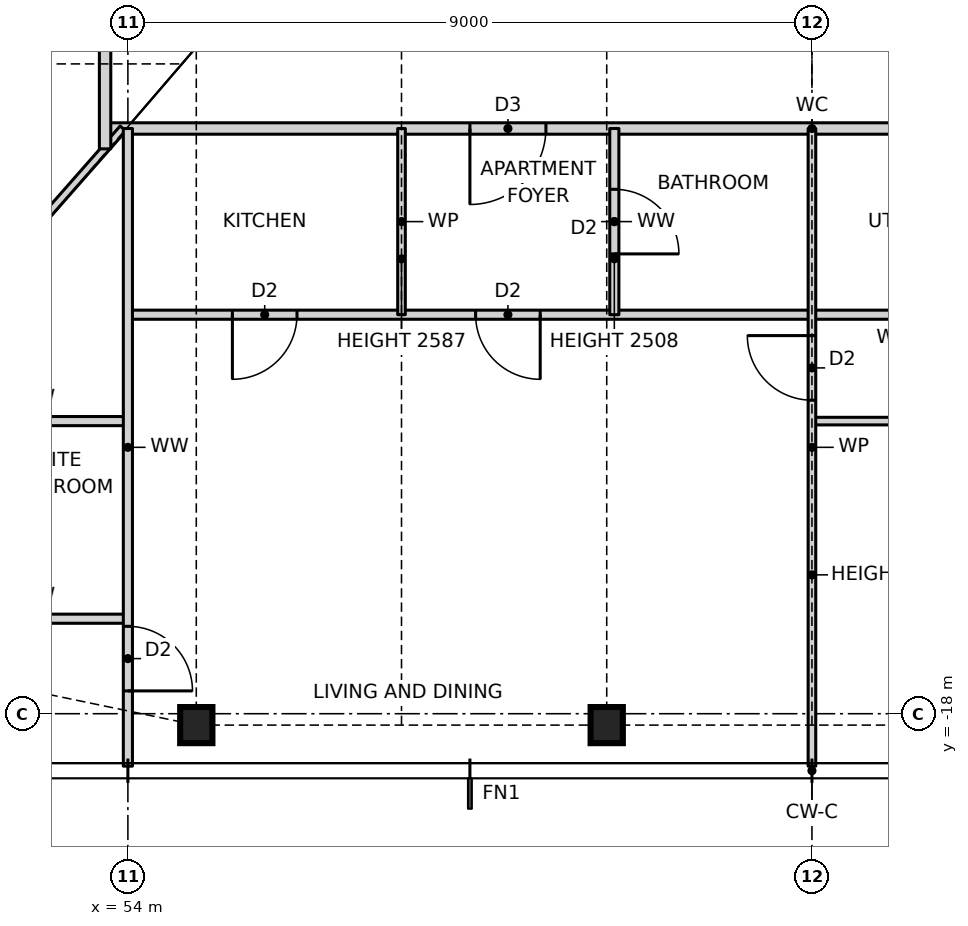
"""IFC4 building model, lengths in metres.
Left out: names, types, materials, properties, quantities, classifications, styles, units other than length and angle.
Written with IfcOpenShell. Run it as: python <this file> out.ifc"""

import sys

from ifc_helpers import new_model, si_unit, direction, frame, frame_2d, origin, origin_2d, place, context, subcontext, project, spatial, rectangle, i_section, extrude, element, fill, save


model = new_model("IFC4")
c1 = context("Model", 3, precision=1e-05, world=origin(), true_north=direction((0.0, 1.0)))
c2 = subcontext(c1, "Body", "Model", "MODEL_VIEW")
j1 = project(units=[si_unit("LENGTHUNIT", "METRE"), si_unit("PLANEANGLEUNIT", "RADIAN")], contexts=[c1])
p1 = place(None, origin())
s1 = spatial("IfcSite", under=j1, at=p1, CompositionType="ELEMENT")
p2 = place(p1, origin())
s2 = spatial("IfcBuilding", under=s1, at=p2, CompositionType="ELEMENT")
p3 = place(p2, frame((0.0, 0.0, 39.5)))
s3 = spatial("IfcBuildingStorey", under=s2, at=p3, CompositionType="ELEMENT", Elevation=39.5)
for number, where, z_axis, x_axis in (
    (1, (54.9, -18.15, 0.0), (0.0, 0.0, 1.0), (1.0, 0.0, 0.0)),
    (2, (60.3, -18.15, 0.0), (0.0, 0.0, 1.0), (1.0, 0.0, 0.0)),
):
    element("IfcColumn", number, at=place(p3, frame(where, z_axis=z_axis, x_axis=x_axis)), inside=s3, PredefinedType="COLUMN", context=c2, shape_type="SweptSolid", body=[
        extrude(i_section(OverallWidth=0.424, OverallDepth=0.475, WebThickness=0.048, FlangeThickness=0.077, at=origin_2d()), origin(), (0.0, 0.0, 1.0), 3.5),
    ])
for number, where, z_axis, x_axis in (
    (3, (51.6, -16.75, 0.0), (0.0, 0.0, 1.0), (1.0, 0.0, 0.0)),
    (4, (51.6, -14.15, 0.0), (0.0, 0.0, 1.0), (1.0, 0.0, 0.0)),
):
    element("IfcWall", number, at=place(p3, frame(where, z_axis=z_axis, x_axis=x_axis)), inside=s3, PredefinedType="PARTITIONING", context=c2, shape_type="SweptSolid", body=[
        extrude(rectangle(XDim=2.4, YDim=0.12, at=frame_2d((1.2, 0.0))), origin(), (0.0, 0.0, 1.0), 3.27),
    ])
p4 = place(p3, frame((63.0, -14.15, 0.0), z_axis=(0.0, 0.0, 1.0), x_axis=(1.0, 0.0, 0.0)))
e5 = element("IfcWall", 5, at=p4, inside=s3, PredefinedType="PARTITIONING", context=c2, shape_type="SweptSolid", body=[
    extrude(rectangle(XDim=11.2, YDim=0.1, at=frame_2d((5.6, 0.0))), origin(), (0.0, 0.0, 1.0), 3.27),
])
p5 = place(p4, frame((1.825, 0.0, 0.0)))
e6 = element("IfcOpeningElement", 6, at=p5, cuts=e5, PredefinedType="OPENING", context=c2, shape_type="SweptSolid", body=[
    extrude(rectangle(XDim=0.85, YDim=2.1, at=frame_2d((0.425, 1.05))), frame((0.0, 0.06, 0.0), z_axis=(0.0, -1.0, 0.0), x_axis=(1.0, 0.0, 0.0)), (0.0, 0.0, 1.0), 0.12),
])
p6 = place(p4, frame((6.325, 0.0, 0.0)))
e7 = element("IfcOpeningElement", 7, at=p6, cuts=e5, PredefinedType="OPENING", context=c2, shape_type="SweptSolid", body=[
    extrude(rectangle(XDim=0.85, YDim=2.1, at=frame_2d((0.425, 1.05))), frame((0.0, 0.06, 0.0), z_axis=(0.0, -1.0, 0.0), x_axis=(1.0, 0.0, 0.0)), (0.0, 0.0, 1.0), 0.12),
])
p7 = place(p4, frame((9.675, 0.0, 0.0)))
e8 = element("IfcOpeningElement", 8, at=p7, cuts=e5, PredefinedType="OPENING", context=c2, shape_type="SweptSolid", body=[
    extrude(rectangle(XDim=0.85, YDim=2.1, at=frame_2d((0.425, 1.05))), frame((0.0, 0.06, 0.0), z_axis=(0.0, -1.0, 0.0), x_axis=(1.0, 0.0, 0.0)), (0.0, 0.0, 1.0), 0.12),
])
p8 = place(p3, frame((54.0, -12.75, 0.0), z_axis=(0.0, 0.0, 1.0), x_axis=(1.0, 0.0, 0.0)))
e9 = element("IfcWall", 9, at=p8, inside=s3, PredefinedType="PARTITIONING", context=c2, shape_type="SweptSolid", body=[
    extrude(rectangle(XDim=20.2, YDim=0.12, at=frame_2d((10.1, 0.0))), origin(), (0.0, 0.0, 1.0), 3.27),
])
p9 = place(p8, frame((1.375, 0.0, 0.0)))
e10 = element("IfcOpeningElement", 10, at=p9, cuts=e9, PredefinedType="OPENING", context=c2, shape_type="SweptSolid", body=[
    extrude(rectangle(XDim=0.85, YDim=2.1, at=frame_2d((0.425, 1.05))), frame((0.0, 0.07, 0.0), z_axis=(0.0, -1.0, 0.0), x_axis=(1.0, 0.0, 0.0)), (0.0, 0.0, 1.0), 0.14),
])
p10 = place(p8, frame((4.575, 0.0, 0.0)))
e11 = element("IfcOpeningElement", 11, at=p10, cuts=e9, PredefinedType="OPENING", context=c2, shape_type="SweptSolid", body=[
    extrude(rectangle(XDim=0.85, YDim=2.1, at=frame_2d((0.425, 1.05))), frame((0.0, 0.07, 0.0), z_axis=(0.0, -1.0, 0.0), x_axis=(1.0, 0.0, 0.0)), (0.0, 0.0, 1.0), 0.14),
])
p11 = place(p8, frame((10.225, 0.0, 0.0)))
e12 = element("IfcOpeningElement", 12, at=p11, cuts=e9, PredefinedType="OPENING", context=c2, shape_type="SweptSolid", body=[
    extrude(rectangle(XDim=0.85, YDim=2.1, at=frame_2d((0.425, 1.05))), frame((0.0, 0.07, 0.0), z_axis=(0.0, -1.0, 0.0), x_axis=(1.0, 0.0, 0.0)), (0.0, 0.0, 1.0), 0.14),
])
p12 = place(p8, frame((15.825, 0.0, 0.0)))
e13 = element("IfcOpeningElement", 13, at=p12, cuts=e9, PredefinedType="OPENING", context=c2, shape_type="SweptSolid", body=[
    extrude(rectangle(XDim=0.85, YDim=2.1, at=frame_2d((0.425, 1.05))), frame((0.0, 0.07, 0.0), z_axis=(0.0, -1.0, 0.0), x_axis=(1.0, 0.0, 0.0)), (0.0, 0.0, 1.0), 0.14),
])
p13 = place(p3, frame((53.7, -10.3, 0.0), z_axis=(0.0, 0.0, 1.0), x_axis=(1.0, 0.0, 0.0)))
e14 = element("IfcWall", 14, at=p13, inside=s3, PredefinedType="PARTITIONING", context=c2, shape_type="SweptSolid", body=[
    extrude(rectangle(XDim=18.6, YDim=0.15, at=frame_2d((9.3, 0.0))), origin(), (0.0, 0.0, 1.0), 3.27),
])
p14 = place(p13, frame((4.8, 0.0, 0.0)))
e15 = element("IfcOpeningElement", 15, at=p14, cuts=e14, PredefinedType="OPENING", context=c2, shape_type="SweptSolid", body=[
    extrude(rectangle(XDim=1.0, YDim=2.1, at=frame_2d((0.5, 1.05))), frame((0.0, 0.085, 0.0), z_axis=(0.0, -1.0, 0.0), x_axis=(1.0, 0.0, 0.0)), (0.0, 0.0, 1.0), 0.17),
])
p15 = place(p3, frame((47.944, -17.109, 0.0), z_axis=(0.0, 0.0, 1.0), x_axis=(0.660638210404, 0.750704439146, 0.0)))
e16 = element("IfcWall", 16, at=p15, inside=s3, PredefinedType="PARTITIONING", context=c2, shape_type="SweptSolid", body=[
    extrude(rectangle(XDim=9.07, YDim=0.1, at=frame_2d((4.535, 0.0))), origin(), (0.0, 0.0, 1.0), 2.429),
])
p16 = place(p3, frame((63.0, -18.69, 0.0), z_axis=(0.0, 0.0, 1.0), x_axis=(0.0, 1.0, 0.0)))
e17 = element("IfcWall", 17, at=p16, inside=s3, PredefinedType="PARTITIONING", context=c2, shape_type="SweptSolid", body=[
    extrude(rectangle(XDim=8.39, YDim=0.1, at=frame_2d((4.195, 0.0))), origin(), (0.0, 0.0, 1.0), 2.587),
])
p17 = place(p16, frame((4.815, 0.0, 0.0)))
e18 = element("IfcOpeningElement", 18, at=p17, cuts=e17, PredefinedType="OPENING", context=c2, shape_type="SweptSolid", body=[
    extrude(rectangle(XDim=0.85, YDim=2.1, at=frame_2d((0.425, 1.05))), frame((0.0, 0.06, 0.0), z_axis=(0.0, -1.0, 0.0), x_axis=(1.0, 0.0, 0.0)), (0.0, 0.0, 1.0), 0.12),
])
p18 = place(p3, frame((60.4, -12.75, 0.0), z_axis=(0.0, 0.0, 1.0), x_axis=(0.0, 1.0, 0.0)))
e19 = element("IfcWall", 19, at=p18, inside=s3, PredefinedType="PARTITIONING", context=c2, shape_type="SweptSolid", body=[
    extrude(rectangle(XDim=2.45, YDim=0.12, at=frame_2d((1.225, 0.0))), origin(), (0.0, 0.0, 1.0), 2.508),
])
p19 = place(p18, frame((0.8, 0.0, 0.0)))
e20 = element("IfcOpeningElement", 20, at=p19, cuts=e19, PredefinedType="OPENING", context=c2, shape_type="SweptSolid", body=[
    extrude(rectangle(XDim=0.85, YDim=2.1, at=frame_2d((0.425, 1.05))), frame((0.0, 0.07, 0.0), z_axis=(0.0, -1.0, 0.0), x_axis=(1.0, 0.0, 0.0)), (0.0, 0.0, 1.0), 0.14),
])
p20 = place(p3, frame((57.6, -12.75, 0.0), z_axis=(0.0, 0.0, 1.0), x_axis=(0.0, 1.0, 0.0)))
e21 = element("IfcWall", 21, at=p20, inside=s3, PredefinedType="PARTITIONING", context=c2, shape_type="SweptSolid", body=[
    extrude(rectangle(XDim=2.45, YDim=0.1, at=frame_2d((1.225, 0.0))), origin(), (0.0, 0.0, 1.0), 2.587),
])
p21 = place(p3, frame((54.0, -18.69, 0.0), z_axis=(0.0, 0.0, 1.0), x_axis=(0.0, 1.0, 0.0)))
e22 = element("IfcWall", 22, at=p21, inside=s3, PredefinedType="PARTITIONING", context=c2, shape_type="SweptSolid", body=[
    extrude(rectangle(XDim=8.39, YDim=0.12, at=frame_2d((4.195, 0.0))), origin(), (0.0, 0.0, 1.0), 3.27),
])
p22 = place(p21, frame((0.99, 0.0, 0.0)))
e23 = element("IfcOpeningElement", 23, at=p22, cuts=e22, PredefinedType="OPENING", context=c2, shape_type="SweptSolid", body=[
    extrude(rectangle(XDim=0.85, YDim=2.1, at=frame_2d((0.425, 1.05))), frame((0.0, 0.07, 0.0), z_axis=(0.0, -1.0, 0.0), x_axis=(1.0, 0.0, 0.0)), (0.0, 0.0, 1.0), 0.14),
])
p23 = place(p3, frame((53.7, -10.568, 0.0), z_axis=(0.0, 0.0, 1.0), x_axis=(0.0, 1.0, 0.0)))
e24 = element("IfcWall", 24, at=p23, inside=s3, PredefinedType="PARTITIONING", context=c2, shape_type="SweptSolid", body=[
    extrude(rectangle(XDim=21.468, YDim=0.15, at=frame_2d((10.734, 0.0))), origin(), (0.0, 0.0, 1.0), 3.27),
])
p24 = place(p23, frame((11.818, 0.0, 0.0)))
e25 = element("IfcOpeningElement", 25, at=p24, cuts=e24, PredefinedType="OPENING", context=c2, shape_type="SweptSolid", body=[
    extrude(rectangle(XDim=1.0, YDim=2.1, at=frame_2d((0.5, 1.05))), frame((0.0, 0.085, 0.0), z_axis=(0.0, -1.0, 0.0), x_axis=(1.0, 0.0, 0.0)), (0.0, 0.0, 1.0), 0.17),
])
p25 = place(p9, frame((0.85, 0.0, 0.0), z_axis=(0.0, 0.0, 1.0), x_axis=(-1.0, 0.0, 0.0)))
e26 = element("IfcDoor", 26, at=p25, inside=s3, OperationType="SINGLE_SWING_RIGHT", PredefinedType="DOOR", context=c2, shape_type="SweptSolid", body=[
    extrude(rectangle(XDim=0.85, YDim=2.1, at=frame_2d((0.425, 1.05))), frame((0.0, 0.025, 0.0), z_axis=(0.0, -1.0, 0.0), x_axis=(1.0, 0.0, 0.0)), (0.0, 0.0, 1.0), 0.05),
])
fill(e10, e26)
p26 = place(p14, frame((1.0, 0.0, 0.0), z_axis=(0.0, 0.0, 1.0), x_axis=(-1.0, 0.0, 0.0)))
e27 = element("IfcDoor", 27, at=p26, inside=s3, OperationType="SINGLE_SWING_RIGHT", PredefinedType="DOOR", context=c2, shape_type="SweptSolid", body=[
    extrude(rectangle(XDim=1.0, YDim=2.1, at=frame_2d((0.5, 1.05))), frame((0.0, 0.025, 0.0), z_axis=(0.0, -1.0, 0.0), x_axis=(1.0, 0.0, 0.0)), (0.0, 0.0, 1.0), 0.05),
])
fill(e15, e27)
p27 = place(p10, frame((0.85, 0.0, 0.0), z_axis=(0.0, 0.0, 1.0), x_axis=(-1.0, 0.0, 0.0)))
e28 = element("IfcDoor", 28, at=p27, inside=s3, OperationType="SINGLE_SWING_LEFT", PredefinedType="DOOR", context=c2, shape_type="SweptSolid", body=[
    extrude(rectangle(XDim=0.85, YDim=2.1, at=frame_2d((0.425, 1.05))), frame((0.0, 0.025, 0.0), z_axis=(0.0, -1.0, 0.0), x_axis=(1.0, 0.0, 0.0)), (0.0, 0.0, 1.0), 0.05),
])
fill(e11, e28)
p28 = place(p19, frame((0.85, 0.0, 0.0), z_axis=(0.0, 0.0, 1.0), x_axis=(-1.0, 0.0, 0.0)))
e29 = element("IfcDoor", 29, at=p28, inside=s3, OperationType="SINGLE_SWING_RIGHT", PredefinedType="DOOR", context=c2, shape_type="SweptSolid", body=[
    extrude(rectangle(XDim=0.85, YDim=2.1, at=frame_2d((0.425, 1.05))), frame((0.0, 0.025, 0.0), z_axis=(0.0, -1.0, 0.0), x_axis=(1.0, 0.0, 0.0)), (0.0, 0.0, 1.0), 0.05),
])
fill(e20, e29)
p29 = place(p22, frame((0.85, 0.0, 0.0), z_axis=(0.0, 0.0, 1.0), x_axis=(-1.0, 0.0, 0.0)))
e30 = element("IfcDoor", 30, at=p29, inside=s3, OperationType="SINGLE_SWING_RIGHT", PredefinedType="DOOR", context=c2, shape_type="SweptSolid", body=[
    extrude(rectangle(XDim=0.85, YDim=2.1, at=frame_2d((0.425, 1.05))), frame((0.0, 0.025, 0.0), z_axis=(0.0, -1.0, 0.0), x_axis=(1.0, 0.0, 0.0)), (0.0, 0.0, 1.0), 0.05),
])
fill(e23, e30)
p30 = place(p17, origin())
e31 = element("IfcDoor", 31, at=p30, inside=s3, OperationType="SINGLE_SWING_RIGHT", PredefinedType="DOOR", context=c2, shape_type="SweptSolid", body=[
    extrude(rectangle(XDim=0.85, YDim=2.1, at=frame_2d((0.425, 1.05))), frame((0.0, 0.025, 0.0), z_axis=(0.0, -1.0, 0.0), x_axis=(1.0, 0.0, 0.0)), (0.0, 0.0, 1.0), 0.05),
])
fill(e18, e31)
save(model, sys.argv[1])
